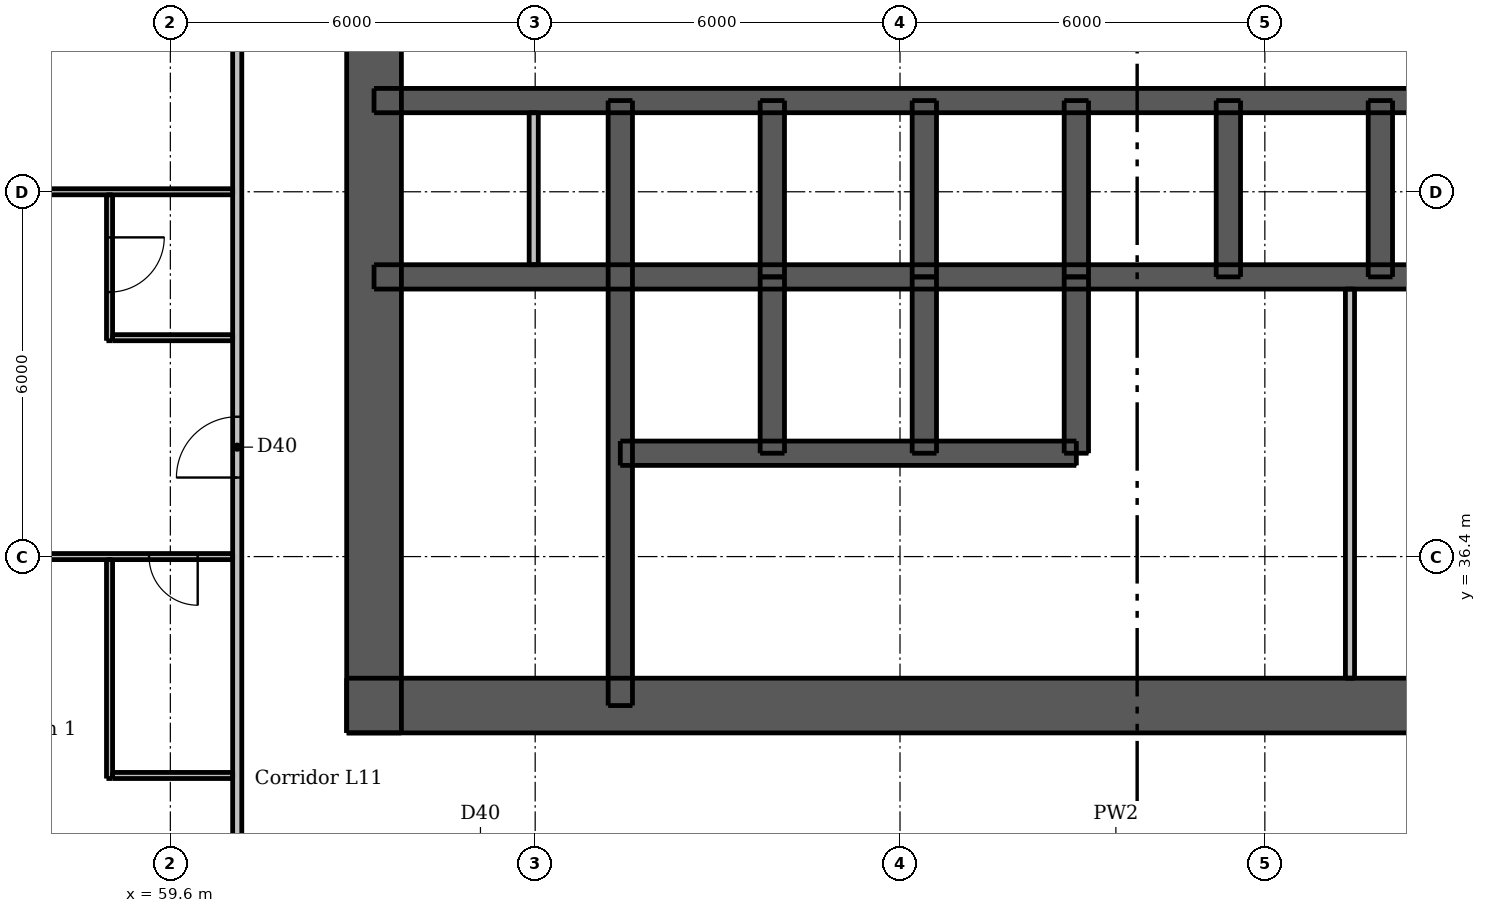
"""IFC4 building model, lengths in metres.
Left out: names, types, materials, properties, quantities, classifications, styles, units other than length and angle.
Written with IfcOpenShell. Run it as: python <this file> out.ifc"""

import sys

from ifc_helpers import new_model, si_unit, direction, frame, frame_2d, origin, place, context, subcontext, project, spatial, rectangle, extrude, element, fill, save


model = new_model("IFC4")
c1 = context("Model", 3, precision=1e-05, world=origin(), true_north=direction((0.0, 1.0)))
c2 = subcontext(c1, "Body", "Model", "MODEL_VIEW")
j1 = project(units=[si_unit("LENGTHUNIT", "METRE"), si_unit("PLANEANGLEUNIT", "RADIAN")], contexts=[c1])
p1 = place(None, origin())
s1 = spatial("IfcSite", under=j1, at=p1, CompositionType="ELEMENT")
p2 = place(p1, origin())
s2 = spatial("IfcBuilding", under=s1, at=p2, CompositionType="ELEMENT")
p3 = place(p2, frame((0.0, 0.0, 43.3)))
s3 = spatial("IfcBuildingStorey", under=s2, at=p3, CompositionType="ELEMENT", Elevation=43.3)
p4 = place(p3, frame((62.5, 33.95, 0.0), z_axis=(0.0, 0.0, 1.0), x_axis=(1.0, 0.0, 0.0)))
e1 = element("IfcWall", 1, at=p4, inside=s3, PredefinedType="SHEAR", context=c2, shape_type="SweptSolid", body=[
    extrude(rectangle(XDim=24.0, YDim=0.9, at=frame_2d((12.0, 0.0))), origin(), (0.0, 0.0, 1.0), 3.05),
])
p5 = place(p4, frame((2.05, 0.0, 0.0)))
e2 = element("IfcOpeningElement", 2, at=p5, cuts=e1, PredefinedType="OPENING", context=c2, shape_type="SweptSolid", body=[
    extrude(rectangle(XDim=1.1, YDim=2.1, at=frame_2d((0.55, 1.05))), frame((0.0, 0.46, 0.0), z_axis=(0.0, -1.0, 0.0), x_axis=(1.0, 0.0, 0.0)), (0.0, 0.0, 1.0), 0.92),
])
p6 = place(p4, frame((20.85, 0.0, 0.0)))
e3 = element("IfcOpeningElement", 3, at=p6, cuts=e1, PredefinedType="OPENING", context=c2, shape_type="SweptSolid", body=[
    extrude(rectangle(XDim=1.1, YDim=2.1, at=frame_2d((0.55, 1.05))), frame((0.0, 0.46, 0.0), z_axis=(0.0, -1.0, 0.0), x_axis=(1.0, 0.0, 0.0)), (0.0, 0.0, 1.0), 0.92),
])
p7 = place(p4, frame((8.0, 0.0, 0.0)))
e4 = element("IfcOpeningElement", 4, at=p7, cuts=e1, PredefinedType="OPENING", context=c2, shape_type="SweptSolid", body=[
    extrude(rectangle(XDim=1.1, YDim=2.1, at=frame_2d((0.55, 1.05))), frame((0.0, 0.46, 0.0), z_axis=(0.0, -1.0, 0.0), x_axis=(1.0, 0.0, 0.0)), (0.0, 0.0, 1.0), 0.92),
])
p8 = place(p4, frame((17.488, 0.0, 0.0)))
e5 = element("IfcOpeningElement", 5, at=p8, cuts=e1, PredefinedType="OPENING", context=c2, shape_type="SweptSolid", body=[
    extrude(rectangle(XDim=0.9, YDim=2.1, at=frame_2d((0.45, 1.05))), frame((0.0, 0.46, 0.0), z_axis=(0.0, -1.0, 0.0), x_axis=(1.0, 0.0, 0.0)), (0.0, 0.0, 1.0), 0.92),
])
p9 = place(p3, frame((62.95, 33.5, 0.0), z_axis=(0.0, 0.0, 1.0), x_axis=(0.0, 1.0, 0.0)))
e6 = element("IfcWall", 6, at=p9, inside=s3, PredefinedType="SHEAR", context=c2, shape_type="SweptSolid", body=[
    extrude(rectangle(XDim=24.0, YDim=0.9, at=frame_2d((12.0, 0.0))), origin(), (0.0, 0.0, 1.0), 3.05),
])
p10 = place(p9, frame((11.2, 0.0, 0.0)))
e7 = element("IfcOpeningElement", 7, at=p10, cuts=e6, PredefinedType="OPENING", context=c2, shape_type="SweptSolid", body=[
    extrude(rectangle(XDim=1.6, YDim=2.1, at=frame_2d((0.8, 1.05))), frame((0.0, 0.46, 0.0), z_axis=(0.0, -1.0, 0.0), x_axis=(1.0, 0.0, 0.0)), (0.0, 0.0, 1.0), 0.92),
])
p11 = place(p3, frame((62.95, 41.0, 0.0), z_axis=(0.0, 0.0, 1.0), x_axis=(1.0, 0.0, 0.0)))
e8 = element("IfcWall", 8, at=p11, inside=s3, PredefinedType="SHEAR", context=c2, shape_type="SweptSolid", body=[
    extrude(rectangle(XDim=23.1, YDim=0.4, at=frame_2d((11.55, 0.0))), origin(), (0.0, 0.0, 1.0), 3.05),
])
p12 = place(p3, frame((62.95, 43.9, 0.0), z_axis=(0.0, 0.0, 1.0), x_axis=(1.0, 0.0, 0.0)))
e9 = element("IfcWall", 9, at=p12, inside=s3, PredefinedType="SHEAR", context=c2, shape_type="SweptSolid", body=[
    extrude(rectangle(XDim=23.1, YDim=0.4, at=frame_2d((11.55, 0.0))), origin(), (0.0, 0.0, 1.0), 3.05),
])
p13 = place(p12, frame((1.088, 0.0, 0.0)))
e10 = element("IfcOpeningElement", 10, at=p13, cuts=e9, PredefinedType="OPENING", context=c2, shape_type="SweptSolid", body=[
    extrude(rectangle(XDim=0.9, YDim=2.1, at=frame_2d((0.45, 1.05))), frame((0.0, 0.21, 0.0), z_axis=(0.0, -1.0, 0.0), x_axis=(1.0, 0.0, 0.0)), (0.0, 0.0, 1.0), 0.42),
])
p14 = place(p12, frame((2.838, 0.0, 0.0)))
e11 = element("IfcOpeningElement", 11, at=p14, cuts=e9, PredefinedType="OPENING", context=c2, shape_type="SweptSolid", body=[
    extrude(rectangle(XDim=0.8, YDim=2.1, at=frame_2d((0.4, 1.05))), frame((0.0, 0.21, 0.0), z_axis=(0.0, -1.0, 0.0), x_axis=(1.0, 0.0, 0.0)), (0.0, 0.0, 1.0), 0.42),
])
p15 = place(p12, frame((20.5, 0.0, 0.0)))
e12 = element("IfcOpeningElement", 12, at=p15, cuts=e9, PredefinedType="OPENING", context=c2, shape_type="SweptSolid", body=[
    extrude(rectangle(XDim=0.9, YDim=2.1, at=frame_2d((0.45, 1.05))), frame((0.0, 0.21, 0.0), z_axis=(0.0, -1.0, 0.0), x_axis=(1.0, 0.0, 0.0)), (0.0, 0.0, 1.0), 0.42),
])
p16 = place(p12, frame((4.75, 0.0, 0.0)))
e13 = element("IfcOpeningElement", 13, at=p16, cuts=e9, PredefinedType="OPENING", context=c2, shape_type="SweptSolid", body=[
    extrude(rectangle(XDim=1.1, YDim=2.1, at=frame_2d((0.55, 1.05))), frame((0.0, 0.21, 0.0), z_axis=(0.0, -1.0, 0.0), x_axis=(1.0, 0.0, 0.0)), (0.0, 0.0, 1.0), 0.42),
])
p17 = place(p12, frame((7.25, 0.0, 0.0)))
e14 = element("IfcOpeningElement", 14, at=p17, cuts=e9, PredefinedType="OPENING", context=c2, shape_type="SweptSolid", body=[
    extrude(rectangle(XDim=1.1, YDim=2.1, at=frame_2d((0.55, 1.05))), frame((0.0, 0.21, 0.0), z_axis=(0.0, -1.0, 0.0), x_axis=(1.0, 0.0, 0.0)), (0.0, 0.0, 1.0), 0.42),
])
p18 = place(p12, frame((9.75, 0.0, 0.0)))
e15 = element("IfcOpeningElement", 15, at=p18, cuts=e9, PredefinedType="OPENING", context=c2, shape_type="SweptSolid", body=[
    extrude(rectangle(XDim=1.1, YDim=2.1, at=frame_2d((0.55, 1.05))), frame((0.0, 0.21, 0.0), z_axis=(0.0, -1.0, 0.0), x_axis=(1.0, 0.0, 0.0)), (0.0, 0.0, 1.0), 0.42),
])
p19 = place(p12, frame((12.25, 0.0, 0.0)))
e16 = element("IfcOpeningElement", 16, at=p19, cuts=e9, PredefinedType="OPENING", context=c2, shape_type="SweptSolid", body=[
    extrude(rectangle(XDim=1.1, YDim=2.1, at=frame_2d((0.55, 1.05))), frame((0.0, 0.21, 0.0), z_axis=(0.0, -1.0, 0.0), x_axis=(1.0, 0.0, 0.0)), (0.0, 0.0, 1.0), 0.42),
])
p20 = place(p12, frame((14.75, 0.0, 0.0)))
e17 = element("IfcOpeningElement", 17, at=p20, cuts=e9, PredefinedType="OPENING", context=c2, shape_type="SweptSolid", body=[
    extrude(rectangle(XDim=1.1, YDim=2.1, at=frame_2d((0.55, 1.05))), frame((0.0, 0.21, 0.0), z_axis=(0.0, -1.0, 0.0), x_axis=(1.0, 0.0, 0.0)), (0.0, 0.0, 1.0), 0.42),
])
p21 = place(p12, frame((17.25, 0.0, 0.0)))
e18 = element("IfcOpeningElement", 18, at=p21, cuts=e9, PredefinedType="OPENING", context=c2, shape_type="SweptSolid", body=[
    extrude(rectangle(XDim=1.1, YDim=2.1, at=frame_2d((0.55, 1.05))), frame((0.0, 0.21, 0.0), z_axis=(0.0, -1.0, 0.0), x_axis=(1.0, 0.0, 0.0)), (0.0, 0.0, 1.0), 0.42),
])
p22 = place(p3, frame((67.0, 33.95, 0.0), z_axis=(0.0, 0.0, 1.0), x_axis=(0.0, 1.0, 0.0)))
e19 = element("IfcWall", 19, at=p22, inside=s3, PredefinedType="SHEAR", context=c2, shape_type="SweptSolid", body=[
    extrude(rectangle(XDim=9.95, YDim=0.4, at=frame_2d((4.975, 0.0))), origin(), (0.0, 0.0, 1.0), 3.05),
])
p23 = place(p22, frame((0.65, 0.0, 0.0)))
e20 = element("IfcOpeningElement", 20, at=p23, cuts=e19, PredefinedType="OPENING", context=c2, shape_type="SweptSolid", body=[
    extrude(rectangle(XDim=1.1, YDim=2.1, at=frame_2d((0.55, 1.05))), frame((0.0, 0.21, 0.0), z_axis=(0.0, -1.0, 0.0), x_axis=(1.0, 0.0, 0.0)), (0.0, 0.0, 1.0), 0.42),
])
for number, where, z_axis, x_axis in (
    (21, (69.5, 41.0, 0.0), (0.0, 0.0, 1.0), (0.0, 1.0, 0.0)),
    (22, (72.0, 41.0, 0.0), (0.0, 0.0, 1.0), (0.0, 1.0, 0.0)),
    (23, (74.5, 41.0, 0.0), (0.0, 0.0, 1.0), (0.0, 1.0, 0.0)),
    (24, (77.0, 41.0, 0.0), (0.0, 0.0, 1.0), (0.0, 1.0, 0.0)),
    (25, (79.5, 41.0, 0.0), (0.0, 0.0, 1.0), (0.0, 1.0, 0.0)),
):
    element("IfcWall", number, at=place(p3, frame(where, z_axis=z_axis, x_axis=x_axis)), inside=s3, PredefinedType="SHEAR", context=c2, shape_type="SweptSolid", body=[
        extrude(rectangle(XDim=2.9, YDim=0.4, at=frame_2d((1.45, 0.0))), origin(), (0.0, 0.0, 1.0), 3.05),
    ])
p24 = place(p3, frame((67.0, 38.1, 0.0), z_axis=(0.0, 0.0, 1.0), x_axis=(1.0, 0.0, 0.0)))
e26 = element("IfcWall", 26, at=p24, inside=s3, PredefinedType="SHEAR", context=c2, shape_type="SweptSolid", body=[
    extrude(rectangle(XDim=7.5, YDim=0.4, at=frame_2d((3.75, 0.0))), origin(), (0.0, 0.0, 1.0), 3.05),
])
p25 = place(p24, frame((0.7, 0.0, 0.0)))
e27 = element("IfcOpeningElement", 27, at=p25, cuts=e26, PredefinedType="OPENING", context=c2, shape_type="SweptSolid", body=[
    extrude(rectangle(XDim=1.1, YDim=2.1, at=frame_2d((0.55, 1.05))), frame((0.0, 0.21, 0.0), z_axis=(0.0, -1.0, 0.0), x_axis=(1.0, 0.0, 0.0)), (0.0, 0.0, 1.0), 0.42),
])
p26 = place(p24, frame((3.2, 0.0, 0.0)))
e28 = element("IfcOpeningElement", 28, at=p26, cuts=e26, PredefinedType="OPENING", context=c2, shape_type="SweptSolid", body=[
    extrude(rectangle(XDim=1.1, YDim=2.1, at=frame_2d((0.55, 1.05))), frame((0.0, 0.21, 0.0), z_axis=(0.0, -1.0, 0.0), x_axis=(1.0, 0.0, 0.0)), (0.0, 0.0, 1.0), 0.42),
])
p27 = place(p24, frame((5.65, 0.0, 0.0)))
e29 = element("IfcOpeningElement", 29, at=p27, cuts=e26, PredefinedType="OPENING", context=c2, shape_type="SweptSolid", body=[
    extrude(rectangle(XDim=1.2, YDim=2.1, at=frame_2d((0.6, 1.05))), frame((0.0, 0.21, 0.0), z_axis=(0.0, -1.0, 0.0), x_axis=(1.0, 0.0, 0.0)), (0.0, 0.0, 1.0), 0.42),
])
for number, where, z_axis, x_axis in (
    (30, (69.5, 38.1, 0.0), (0.0, 0.0, 1.0), (0.0, 1.0, 0.0)),
    (31, (72.0, 38.1, 0.0), (0.0, 0.0, 1.0), (0.0, 1.0, 0.0)),
    (32, (74.5, 38.1, 0.0), (0.0, 0.0, 1.0), (0.0, 1.0, 0.0)),
):
    element("IfcWall", number, at=place(p3, frame(where, z_axis=z_axis, x_axis=x_axis)), inside=s3, PredefinedType="SHEAR", context=c2, shape_type="SweptSolid", body=[
        extrude(rectangle(XDim=2.9, YDim=0.4, at=frame_2d((1.45, 0.0))), origin(), (0.0, 0.0, 1.0), 3.05),
    ])
p28 = place(p3, frame((79.0, 34.4, 0.0), z_axis=(0.0, 0.0, 1.0), x_axis=(0.0, 1.0, 0.0)))
e33 = element("IfcWall", 33, at=p28, inside=s3, PredefinedType="PLUMBINGWALL", context=c2, shape_type="SweptSolid", body=[
    extrude(rectangle(XDim=6.4, YDim=0.15, at=frame_2d((3.2, 0.0))), origin(), (0.0, 0.0, 1.0), 3.05),
])
p29 = place(p3, frame((65.576, 41.2, 0.0), z_axis=(0.0, 0.0, 1.0), x_axis=(0.0, 1.0, 0.0)))
e34 = element("IfcWall", 34, at=p29, inside=s3, PredefinedType="PLUMBINGWALL", context=c2, shape_type="SweptSolid", body=[
    extrude(rectangle(XDim=2.5, YDim=0.15, at=frame_2d((1.25, 0.0))), origin(), (0.0, 0.0, 1.0), 3.05),
])
p30 = place(p3, frame((58.6, 32.75, 0.0), z_axis=(0.0, 0.0, 1.0), x_axis=(0.0, 1.0, 0.0)))
e35 = element("IfcWall", 35, at=p30, inside=s3, PredefinedType="PARTITIONING", context=c2, shape_type="SweptSolid", body=[
    extrude(rectangle(XDim=3.6, YDim=0.1, at=frame_2d((1.8, 0.0))), origin(), (0.0, 0.0, 1.0), 3.05),
])
p31 = place(p3, frame((58.6, 42.35, 0.0), z_axis=(0.0, 0.0, 1.0), x_axis=(0.0, -1.0, 0.0)))
e36 = element("IfcWall", 36, at=p31, inside=s3, PredefinedType="PARTITIONING", context=c2, shape_type="SweptSolid", body=[
    extrude(rectangle(XDim=2.4, YDim=0.1, at=frame_2d((1.2, 0.0))), origin(), (0.0, 0.0, 1.0), 3.05),
])
p32 = place(p31, frame((0.7, 0.0, 0.0)))
e37 = element("IfcOpeningElement", 37, at=p32, cuts=e36, PredefinedType="OPENING", context=c2, shape_type="SweptSolid", body=[
    extrude(rectangle(XDim=0.9, YDim=2.1, at=frame_2d((0.45, 1.05))), frame((0.0, 0.06, 0.0), z_axis=(0.0, -1.0, 0.0), x_axis=(1.0, 0.0, 0.0)), (0.0, 0.0, 1.0), 0.12),
])
p33 = place(p3, frame((52.0, 42.4, 0.0), z_axis=(0.0, 0.0, 1.0), x_axis=(1.0, 0.0, 0.0)))
e38 = element("IfcWall", 38, at=p33, inside=s3, PredefinedType="PARTITIONING", context=c2, shape_type="SweptSolid", body=[
    extrude(rectangle(XDim=8.625, YDim=0.1, at=frame_2d((4.312, 0.0))), origin(), (0.0, 0.0, 1.0), 2.516),
])
p34 = place(p33, frame((2.85, 0.0, 0.0)))
e39 = element("IfcOpeningElement", 39, at=p34, cuts=e38, PredefinedType="OPENING", context=c2, shape_type="SweptSolid", body=[
    extrude(rectangle(XDim=0.9, YDim=2.1, at=frame_2d((0.45, 1.05))), frame((0.0, 0.06, 0.0), z_axis=(0.0, -1.0, 0.0), x_axis=(1.0, 0.0, 0.0)), (0.0, 0.0, 1.0), 0.12),
])
p35 = place(p3, frame((58.65, 40.0, 0.0), z_axis=(0.0, 0.0, 1.0), x_axis=(1.0, 0.0, 0.0)))
e40 = element("IfcWall", 40, at=p35, inside=s3, PredefinedType="PARTITIONING", context=c2, shape_type="SweptSolid", body=[
    extrude(rectangle(XDim=1.975, YDim=0.1, at=frame_2d((0.988, 0.0))), origin(), (0.0, 0.0, 1.0), 3.05),
])
p36 = place(p3, frame((60.625, 36.4, 0.0), z_axis=(0.0, 0.0, 1.0), x_axis=(-1.0, 0.0, 0.0)))
e41 = element("IfcWall", 41, at=p36, inside=s3, PredefinedType="PARTITIONING", context=c2, shape_type="SweptSolid", body=[
    extrude(rectangle(XDim=8.625, YDim=0.1, at=frame_2d((4.312, 0.0))), origin(), (0.0, 0.0, 1.0), 2.516),
])
p37 = place(p36, frame((4.875, 0.0, 0.0)))
e42 = element("IfcOpeningElement", 42, at=p37, cuts=e41, PredefinedType="OPENING", context=c2, shape_type="SweptSolid", body=[
    extrude(rectangle(XDim=0.9, YDim=2.1, at=frame_2d((0.45, 1.05))), frame((0.0, 0.06, 0.0), z_axis=(0.0, -1.0, 0.0), x_axis=(1.0, 0.0, 0.0)), (0.0, 0.0, 1.0), 0.12),
])
p38 = place(p36, frame((0.575, 0.0, 0.0)))
e43 = element("IfcOpeningElement", 43, at=p38, cuts=e41, PredefinedType="OPENING", context=c2, shape_type="SweptSolid", body=[
    extrude(rectangle(XDim=0.8, YDim=2.1, at=frame_2d((0.4, 1.05))), frame((0.0, 0.06, 0.0), z_axis=(0.0, -1.0, 0.0), x_axis=(1.0, 0.0, 0.0)), (0.0, 0.0, 1.0), 0.12),
])
p39 = place(p3, frame((58.65, 32.8, 0.0), z_axis=(0.0, 0.0, 1.0), x_axis=(1.0, 0.0, 0.0)))
e44 = element("IfcWall", 44, at=p39, inside=s3, PredefinedType="PARTITIONING", context=c2, shape_type="SweptSolid", body=[
    extrude(rectangle(XDim=1.975, YDim=0.1, at=frame_2d((0.988, 0.0))), origin(), (0.0, 0.0, 1.0), 3.05),
])
p40 = place(p3, frame((60.7, 30.325, 0.0), z_axis=(0.0, 0.0, 1.0), x_axis=(0.0, 1.0, 0.0)))
e45 = element("IfcWall", 45, at=p40, inside=s3, PredefinedType="PARTITIONING", context=c2, shape_type="SweptSolid", body=[
    extrude(rectangle(XDim=28.9, YDim=0.15, at=frame_2d((14.45, 0.0))), origin(), (0.0, 0.0, 1.0), 3.05),
])
p41 = place(p40, frame((7.375, 0.0, 0.0)))
e46 = element("IfcOpeningElement", 46, at=p41, cuts=e45, PredefinedType="OPENING", context=c2, shape_type="SweptSolid", body=[
    extrude(rectangle(XDim=1.0, YDim=2.1, at=frame_2d((0.5, 1.05))), frame((0.0, 0.085, 0.0), z_axis=(0.0, -1.0, 0.0), x_axis=(1.0, 0.0, 0.0)), (0.0, 0.0, 1.0), 0.17),
])
p42 = place(p40, frame((26.025, 0.0, 0.0)))
e47 = element("IfcOpeningElement", 47, at=p42, cuts=e45, PredefinedType="OPENING", context=c2, shape_type="SweptSolid", body=[
    extrude(rectangle(XDim=1.0, YDim=2.1, at=frame_2d((0.5, 1.05))), frame((0.0, 0.085, 0.0), z_axis=(0.0, -1.0, 0.0), x_axis=(1.0, 0.0, 0.0)), (0.0, 0.0, 1.0), 0.17),
])
p43 = place(p5, origin())
e48 = element("IfcDoor", 48, at=p43, inside=s3, OperationType="SINGLE_SWING_LEFT", PredefinedType="DOOR", context=c2, shape_type="SweptSolid", body=[
    extrude(rectangle(XDim=1.1, YDim=2.1, at=frame_2d((0.55, 1.05))), frame((0.0, 0.438, 0.0), z_axis=(0.0, -1.0, 0.0), x_axis=(1.0, 0.0, 0.0)), (0.0, 0.0, 1.0), 0.05),
])
fill(e2, e48)
p44 = place(p7, origin())
e49 = element("IfcDoor", 49, at=p44, inside=s3, OperationType="SINGLE_SWING_LEFT", PredefinedType="DOOR", context=c2, shape_type="SweptSolid", body=[
    extrude(rectangle(XDim=1.1, YDim=2.1, at=frame_2d((0.55, 1.05))), frame((0.0, 0.438, 0.0), z_axis=(0.0, -1.0, 0.0), x_axis=(1.0, 0.0, 0.0)), (0.0, 0.0, 1.0), 0.05),
])
fill(e4, e49)
p45 = place(p23, origin())
e50 = element("IfcDoor", 50, at=p45, inside=s3, OperationType="SINGLE_SWING_RIGHT", PredefinedType="DOOR", context=c2, shape_type="SweptSolid", body=[
    extrude(rectangle(XDim=1.1, YDim=2.1, at=frame_2d((0.55, 1.05))), frame((0.0, -0.138, 0.0), z_axis=(0.0, -1.0, 0.0), x_axis=(1.0, 0.0, 0.0)), (0.0, 0.0, 1.0), 0.05),
])
fill(e20, e50)
p46 = place(p13, origin())
e51 = element("IfcDoor", 51, at=p46, inside=s3, OperationType="SINGLE_SWING_LEFT", PredefinedType="DOOR", context=c2, shape_type="SweptSolid", body=[
    extrude(rectangle(XDim=0.9, YDim=2.1, at=frame_2d((0.45, 1.05))), frame((0.0, -0.138, 0.0), z_axis=(0.0, -1.0, 0.0), x_axis=(1.0, 0.0, 0.0)), (0.0, 0.0, 1.0), 0.05),
])
fill(e10, e51)
p47 = place(p14, origin())
e52 = element("IfcDoor", 52, at=p47, inside=s3, OperationType="SINGLE_SWING_RIGHT", PredefinedType="DOOR", context=c2, shape_type="SweptSolid", body=[
    extrude(rectangle(XDim=0.8, YDim=2.1, at=frame_2d((0.4, 1.05))), frame((0.0, -0.138, 0.0), z_axis=(0.0, -1.0, 0.0), x_axis=(1.0, 0.0, 0.0)), (0.0, 0.0, 1.0), 0.05),
])
fill(e11, e52)
p48 = place(p16, origin())
e53 = element("IfcDoor", 53, at=p48, inside=s3, OperationType="DOUBLE_DOOR_SLIDING", PredefinedType="DOOR", context=c2, shape_type="SweptSolid", body=[
    extrude(rectangle(XDim=1.1, YDim=2.1, at=frame_2d((0.55, 1.05))), frame((0.0, 0.025, 0.0), z_axis=(0.0, -1.0, 0.0), x_axis=(1.0, 0.0, 0.0)), (0.0, 0.0, 1.0), 0.05),
])
fill(e13, e53)
p49 = place(p17, origin())
e54 = element("IfcDoor", 54, at=p49, inside=s3, OperationType="DOUBLE_DOOR_SLIDING", PredefinedType="DOOR", context=c2, shape_type="SweptSolid", body=[
    extrude(rectangle(XDim=1.1, YDim=2.1, at=frame_2d((0.55, 1.05))), frame((0.0, 0.025, 0.0), z_axis=(0.0, -1.0, 0.0), x_axis=(1.0, 0.0, 0.0)), (0.0, 0.0, 1.0), 0.05),
])
fill(e14, e54)
p50 = place(p18, origin())
e55 = element("IfcDoor", 55, at=p50, inside=s3, OperationType="DOUBLE_DOOR_SLIDING", PredefinedType="DOOR", context=c2, shape_type="SweptSolid", body=[
    extrude(rectangle(XDim=1.1, YDim=2.1, at=frame_2d((0.55, 1.05))), frame((0.0, 0.025, 0.0), z_axis=(0.0, -1.0, 0.0), x_axis=(1.0, 0.0, 0.0)), (0.0, 0.0, 1.0), 0.05),
])
fill(e15, e55)
p51 = place(p19, origin())
e56 = element("IfcDoor", 56, at=p51, inside=s3, OperationType="DOUBLE_DOOR_SLIDING", PredefinedType="DOOR", context=c2, shape_type="SweptSolid", body=[
    extrude(rectangle(XDim=1.1, YDim=2.1, at=frame_2d((0.55, 1.05))), frame((0.0, 0.025, 0.0), z_axis=(0.0, -1.0, 0.0), x_axis=(1.0, 0.0, 0.0)), (0.0, 0.0, 1.0), 0.05),
])
fill(e16, e56)
p52 = place(p20, origin())
e57 = element("IfcDoor", 57, at=p52, inside=s3, OperationType="DOUBLE_DOOR_SLIDING", PredefinedType="DOOR", context=c2, shape_type="SweptSolid", body=[
    extrude(rectangle(XDim=1.1, YDim=2.1, at=frame_2d((0.55, 1.05))), frame((0.0, 0.025, 0.0), z_axis=(0.0, -1.0, 0.0), x_axis=(1.0, 0.0, 0.0)), (0.0, 0.0, 1.0), 0.05),
])
fill(e17, e57)
p53 = place(p25, origin())
e58 = element("IfcDoor", 58, at=p53, inside=s3, OperationType="DOUBLE_DOOR_SLIDING", PredefinedType="DOOR", context=c2, shape_type="SweptSolid", body=[
    extrude(rectangle(XDim=1.1, YDim=2.1, at=frame_2d((0.55, 1.05))), frame((0.0, 0.025, 0.0), z_axis=(0.0, -1.0, 0.0), x_axis=(1.0, 0.0, 0.0)), (0.0, 0.0, 1.0), 0.05),
])
fill(e27, e58)
p54 = place(p26, origin())
e59 = element("IfcDoor", 59, at=p54, inside=s3, OperationType="DOUBLE_DOOR_SLIDING", PredefinedType="DOOR", context=c2, shape_type="SweptSolid", body=[
    extrude(rectangle(XDim=1.1, YDim=2.1, at=frame_2d((0.55, 1.05))), frame((0.0, 0.025, 0.0), z_axis=(0.0, -1.0, 0.0), x_axis=(1.0, 0.0, 0.0)), (0.0, 0.0, 1.0), 0.05),
])
fill(e28, e59)
p55 = place(p27, origin())
e60 = element("IfcDoor", 60, at=p55, inside=s3, OperationType="DOUBLE_DOOR_SLIDING", PredefinedType="DOOR", context=c2, shape_type="SweptSolid", body=[
    extrude(rectangle(XDim=1.2, YDim=2.1, at=frame_2d((0.6, 1.05))), frame((0.0, 0.025, 0.0), z_axis=(0.0, -1.0, 0.0), x_axis=(1.0, 0.0, 0.0)), (0.0, 0.0, 1.0), 0.05),
])
fill(e29, e60)
p56 = place(p41, origin())
e61 = element("IfcDoor", 61, at=p56, inside=s3, OperationType="SINGLE_SWING_LEFT", PredefinedType="DOOR", context=c2, shape_type="SweptSolid", body=[
    extrude(rectangle(XDim=1.0, YDim=2.1, at=frame_2d((0.5, 1.05))), frame((0.0, 0.025, 0.0), z_axis=(0.0, -1.0, 0.0), x_axis=(1.0, 0.0, 0.0)), (0.0, 0.0, 1.0), 0.05),
])
fill(e46, e61)
p57 = place(p32, origin())
e62 = element("IfcDoor", 62, at=p57, inside=s3, OperationType="SINGLE_SWING_LEFT", PredefinedType="DOOR", context=c2, shape_type="SweptSolid", body=[
    extrude(rectangle(XDim=0.9, YDim=2.1, at=frame_2d((0.45, 1.05))), frame((0.0, 0.025, 0.0), z_axis=(0.0, -1.0, 0.0), x_axis=(1.0, 0.0, 0.0)), (0.0, 0.0, 1.0), 0.05),
])
fill(e37, e62)
p58 = place(p38, origin())
e63 = element("IfcDoor", 63, at=p58, inside=s3, OperationType="SINGLE_SWING_LEFT", PredefinedType="DOOR", context=c2, shape_type="SweptSolid", body=[
    extrude(rectangle(XDim=0.8, YDim=2.1, at=frame_2d((0.4, 1.05))), frame((0.0, 0.025, 0.0), z_axis=(0.0, -1.0, 0.0), x_axis=(1.0, 0.0, 0.0)), (0.0, 0.0, 1.0), 0.05),
])
fill(e43, e63)
save(model, sys.argv[1])
